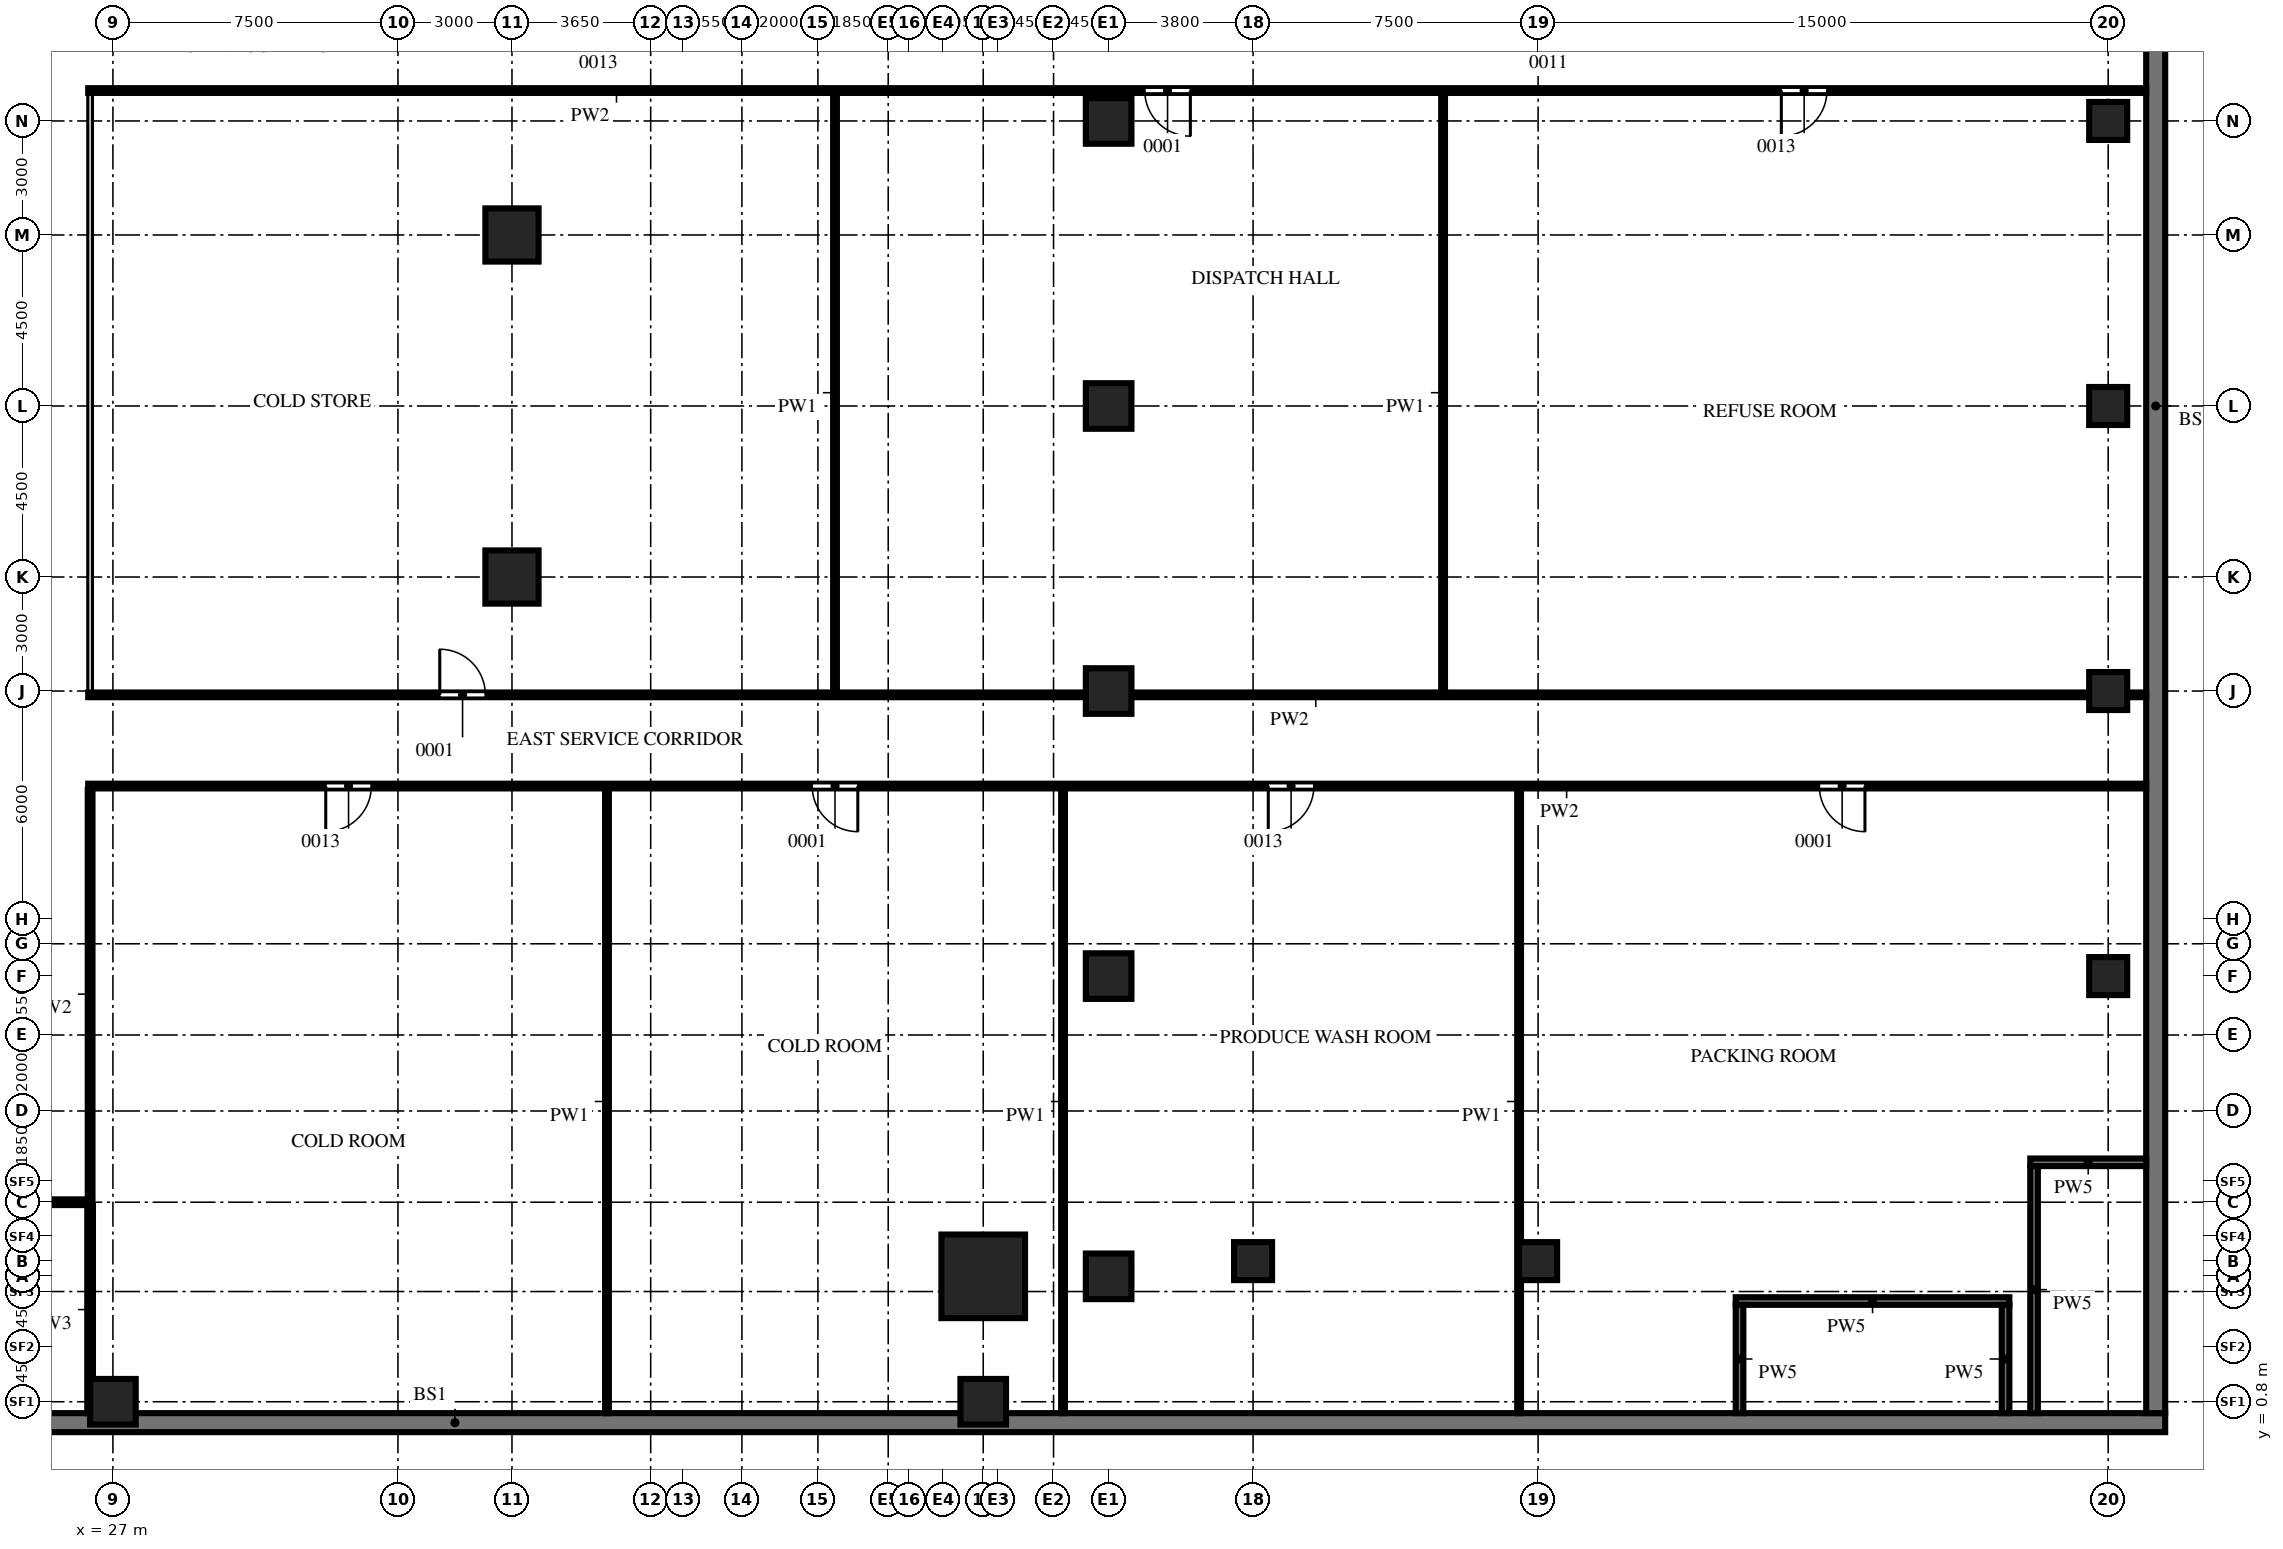
"""IFC4 building model, lengths in metres.
Left out: names, types, materials, properties, quantities, classifications, styles, units other than length and angle.
Written with IfcOpenShell. Run it as: python <this file> out.ifc"""

import sys

from ifc_helpers import new_model, si_unit, direction, frame, frame_2d, origin, origin_2d, place, context, subcontext, project, spatial, rectangle, extrude, source, transform, mapped, element, fill, save


model = new_model("IFC4")
c1 = context("Model", 3, precision=1e-05, world=origin(), true_north=direction((0.0, 1.0)))
c2 = subcontext(c1, "Body", "Model", "MODEL_VIEW")
j1 = project(units=[si_unit("LENGTHUNIT", "METRE"), si_unit("PLANEANGLEUNIT", "RADIAN")], contexts=[c1])
p1 = place(None, origin())
s1 = spatial("IfcSite", under=j1, at=p1, CompositionType="ELEMENT")
p2 = place(p1, origin())
s2 = spatial("IfcBuilding", under=s1, at=p2, CompositionType="ELEMENT")
p3 = place(p2, frame((0.0, 0.0, -4.5)))
s3 = spatial("IfcBuildingStorey", under=s2, at=p3, CompositionType="ELEMENT", Elevation=-4.5)
m1 = source(origin(), c2, "Body", "SweptSolid", [
    extrude(rectangle(XDim=90.0, YDim=0.5, at=frame_2d((45.0, 0.0))), origin(), (0.0, 0.0, 1.0), 4.15),
])
p4 = place(p3, frame((-9.0, 0.25, 0.0), z_axis=(0.0, 0.0, 1.0), x_axis=(1.0, 0.0, 0.0)))
e1 = element("IfcWall", 1, at=p4, inside=s3, PredefinedType="STANDARD", context=c2, shape_type="MappedRepresentation", body=[
    mapped(m1, transform((0.0, 0.0, 0.0))),
])
m2 = source(origin(), c2, "Body", "SweptSolid", [
    extrude(rectangle(XDim=53.0, YDim=0.5, at=frame_2d((26.5, 0.0))), origin(), (0.0, 0.0, 1.0), 4.15),
])
p5 = place(p3, frame((80.75, 0.5, 0.0), z_axis=(0.0, 0.0, 1.0), x_axis=(0.0, 1.0, 0.0)))
e2 = element("IfcWall", 2, at=p5, inside=s3, PredefinedType="STANDARD", context=c2, shape_type="MappedRepresentation", body=[
    mapped(m2, transform((0.0, 0.0, 0.0))),
])
m3 = source(origin(), c2, "Body", "SweptSolid", [
    extrude(rectangle(XDim=2.2, YDim=2.2, at=origin_2d()), origin(), (0.0, 0.0, 1.0), 4.5),
])
p6 = place(p3, frame((49.9, 4.1, 0.0), z_axis=(0.0, 0.0, 1.0), x_axis=(1.0, 0.0, 0.0)))
e3 = element("IfcColumn", 3, at=p6, inside=s3, PredefinedType="COLUMN", context=c2, shape_type="MappedRepresentation", body=[
    mapped(m3, transform((0.0, 0.0, 0.0))),
])
m4 = source(origin(), c2, "Body", "SweptSolid", [
    extrude(rectangle(XDim=1.2, YDim=1.2, at=origin_2d()), origin(), (0.0, 0.0, 1.0), 4.15),
])
for number, where, z_axis, x_axis in (
    (4, (27.0, 0.8, 0.0), (0.0, 0.0, 1.0), (1.0, 0.0, 0.0)),
    (5, (49.9, 0.8, 0.0), (0.0, 0.0, 1.0), (1.0, 0.0, 0.0)),
    (6, (53.2, 4.1, 0.0), (0.0, 0.0, 1.0), (1.0, 0.0, 0.0)),
    (7, (53.2, 12.0, 0.0), (0.0, 0.0, 1.0), (1.0, 0.0, 0.0)),
    (8, (53.2, 19.5, 0.0), (0.0, 0.0, 1.0), (1.0, 0.0, 0.0)),
    (9, (53.2, 27.0, 0.0), (0.0, 0.0, 1.0), (1.0, 0.0, 0.0)),
    (10, (53.2, 34.5, 0.0), (0.0, 0.0, 1.0), (1.0, 0.0, 0.0)),
):
    element("IfcColumn", number, at=place(p3, frame(where, z_axis=z_axis, x_axis=x_axis)), inside=s3, PredefinedType="COLUMN", context=c2, shape_type="MappedRepresentation", body=[
        mapped(m4, transform((0.0, 0.0, 0.0))),
    ])
m5 = source(origin(), c2, "Body", "SweptSolid", [
    extrude(rectangle(XDim=1.4, YDim=1.4, at=origin_2d()), origin(), (0.0, 0.0, 1.0), 4.15),
])
for number, where, z_axis, x_axis in (
    (11, (37.5, 22.5, 0.0), (0.0, 0.0, 1.0), (1.0, 0.0, 0.0)),
    (12, (37.5, 31.5, 0.0), (0.0, 0.0, 1.0), (1.0, 0.0, 0.0)),
):
    element("IfcColumn", number, at=place(p3, frame(where, z_axis=z_axis, x_axis=x_axis)), inside=s3, PredefinedType="COLUMN", context=c2, shape_type="MappedRepresentation", body=[
        mapped(m5, transform((0.0, 0.0, 0.0))),
    ])
m6 = source(origin(), c2, "Body", "SweptSolid", [
    extrude(rectangle(XDim=1.0, YDim=1.0, at=origin_2d()), origin(), (0.0, 0.0, 1.0), 4.15),
])
for number, where, z_axis, x_axis in (
    (13, (57.0, 4.5, 0.0), (0.0, 0.0, 1.0), (1.0, 0.0, 0.0)),
    (14, (64.5, 4.5, 0.0), (0.0, 0.0, 1.0), (1.0, 0.0, 0.0)),
    (15, (79.5, 12.0, 0.0), (0.0, 0.0, 1.0), (1.0, 0.0, 0.0)),
    (16, (79.5, 19.5, 0.0), (0.0, 0.0, 1.0), (1.0, 0.0, 0.0)),
    (17, (79.5, 27.0, 0.0), (0.0, 0.0, 1.0), (1.0, 0.0, 0.0)),
    (18, (79.5, 34.5, 0.0), (0.0, 0.0, 1.0), (1.0, 0.0, 0.0)),
):
    element("IfcColumn", number, at=place(p3, frame(where, z_axis=z_axis, x_axis=x_axis)), inside=s3, PredefinedType="COLUMN", context=c2, shape_type="MappedRepresentation", body=[
        mapped(m6, transform((0.0, 0.0, 0.0))),
    ])
m7 = source(origin(), c2, "Body", "SweptSolid", [
    extrude(rectangle(XDim=5.45, YDim=0.15, at=frame_2d((2.725, 0.0))), origin(), (0.0, 0.0, 1.0), 4.15),
])
p7 = place(p3, frame((26.4, 0.5, 0.0), z_axis=(0.0, 0.0, 1.0), x_axis=(0.0, 1.0, 0.0)))
e19 = element("IfcWall", 19, at=p7, inside=s3, PredefinedType="PARTITIONING", context=c2, shape_type="MappedRepresentation", body=[
    mapped(m7, transform((0.0, 0.0, 0.0))),
])
m8 = source(origin(), c2, "Body", "SweptSolid", [
    extrude(rectangle(XDim=16.4, YDim=0.1, at=frame_2d((8.2, 0.0))), origin(), (0.0, 0.0, 1.0), 4.15),
])
for number, where, z_axis, x_axis in (
    (20, (40.0, 0.5, 0.0), (0.0, 0.0, 1.0), (0.0, 1.0, 0.0)),
    (21, (52.0, 0.5, 0.0), (0.0, 0.0, 1.0), (0.0, 1.0, 0.0)),
    (22, (64.0, 0.5, 0.0), (0.0, 0.0, 1.0), (0.0, 1.0, 0.0)),
):
    element("IfcWall", number, at=place(p3, frame(where, z_axis=z_axis, x_axis=x_axis)), inside=s3, PredefinedType="PARTITIONING", context=c2, shape_type="MappedRepresentation", body=[
        mapped(m8, transform((0.0, 0.0, 0.0))),
    ])
m9 = source(origin(), c2, "Body", "SweptSolid", [
    extrude(rectangle(XDim=22.3, YDim=0.15, at=frame_2d((11.15, 0.0))), origin(), (0.0, 0.0, 1.0), 4.15),
])
p8 = place(p3, frame((4.15, 6.05, 0.0), z_axis=(0.0, 0.0, 1.0), x_axis=(1.0, 0.0, 0.0)))
e23 = element("IfcWall", 23, at=p8, inside=s3, PredefinedType="PARTITIONING", context=c2, shape_type="MappedRepresentation", body=[
    mapped(m9, transform((0.0, 0.0, 0.0))),
])
m10 = source(origin(), c2, "Body", "SweptSolid", [
    extrude(rectangle(XDim=1.2, YDim=2.1, at=frame_2d((0.6, 1.05))), frame((0.0, 0.085, 0.0), z_axis=(0.0, -1.0, 0.0), x_axis=(1.0, 0.0, 0.0)), (0.0, 0.0, 1.0), 0.17),
])
p9 = place(p8, frame((9.2, 0.0, 0.0)))
e24 = element("IfcOpeningElement", 24, at=p9, cuts=e23, PredefinedType="OPENING", context=c2, shape_type="MappedRepresentation", body=[
    mapped(m10, transform((0.0, 0.0, 0.0))),
])
m11 = source(origin(), c2, "Body", "SweptSolid", [
    extrude(rectangle(XDim=10.75, YDim=0.125, at=frame_2d((5.375, 0.0))), origin(), (0.0, 0.0, 1.0), 4.15),
])
p10 = place(p3, frame((26.4, 6.15, 0.0), z_axis=(0.0, 0.0, 1.0), x_axis=(0.0, 1.0, 0.0)))
e25 = element("IfcWall", 25, at=p10, inside=s3, PredefinedType="PARTITIONING", context=c2, shape_type="MappedRepresentation", body=[
    mapped(m11, transform((0.0, 0.0, 0.0))),
])
m12 = source(origin(), c2, "Body", "SweptSolid", [
    extrude(rectangle(XDim=54.15, YDim=0.125, at=frame_2d((27.075, 0.0))), origin(), (0.0, 0.0, 1.0), 4.15),
])
p11 = place(p3, frame((26.35, 17.0, 0.0), z_axis=(0.0, 0.0, 1.0), x_axis=(1.0, 0.0, 0.0)))
e26 = element("IfcWall", 26, at=p11, inside=s3, PredefinedType="PARTITIONING", context=c2, shape_type="MappedRepresentation", body=[
    mapped(m12, transform((0.0, 0.0, 0.0))),
])
m13 = source(origin(), c2, "Body", "SweptSolid", [
    extrude(rectangle(XDim=1.2, YDim=2.1, at=frame_2d((0.6, 1.05))), frame((0.0, 0.073, 0.0), z_axis=(0.0, -1.0, 0.0), x_axis=(1.0, 0.0, 0.0)), (0.0, 0.0, 1.0), 0.145),
])
p12 = place(p11, frame((6.25, 0.0, 0.0)))
e27 = element("IfcOpeningElement", 27, at=p12, cuts=e26, PredefinedType="OPENING", context=c2, shape_type="MappedRepresentation", body=[
    mapped(m13, transform((0.0, 0.0, 0.0))),
])
p13 = place(p11, frame((19.05, 0.0, 0.0)))
e28 = element("IfcOpeningElement", 28, at=p13, cuts=e26, PredefinedType="OPENING", context=c2, shape_type="MappedRepresentation", body=[
    mapped(m13, transform((0.0, 0.0, 0.0))),
])
p14 = place(p11, frame((31.05, 0.0, 0.0)))
e29 = element("IfcOpeningElement", 29, at=p14, cuts=e26, PredefinedType="OPENING", context=c2, shape_type="MappedRepresentation", body=[
    mapped(m13, transform((0.0, 0.0, 0.0))),
])
p15 = place(p11, frame((45.55, 0.0, 0.0)))
e30 = element("IfcOpeningElement", 30, at=p15, cuts=e26, PredefinedType="OPENING", context=c2, shape_type="MappedRepresentation", body=[
    mapped(m13, transform((0.0, 0.0, 0.0))),
])
p16 = place(p3, frame((26.35, 19.4, 0.0), z_axis=(0.0, 0.0, 1.0), x_axis=(1.0, 0.0, 0.0)))
e31 = element("IfcWall", 31, at=p16, inside=s3, PredefinedType="PARTITIONING", context=c2, shape_type="MappedRepresentation", body=[
    mapped(m12, transform((0.0, 0.0, 0.0))),
])
p17 = place(p16, frame((9.25, 0.0, 0.0)))
e32 = element("IfcOpeningElement", 32, at=p17, cuts=e31, PredefinedType="OPENING", context=c2, shape_type="MappedRepresentation", body=[
    mapped(m13, transform((0.0, 0.0, 0.0))),
])
m14 = source(origin(), c2, "Body", "SweptSolid", [
    extrude(rectangle(XDim=15.7, YDim=0.125, at=frame_2d((7.85, 0.0))), origin(), (0.0, 0.0, 1.0), 4.15),
])
p18 = place(p3, frame((26.4, 19.5, 0.0), z_axis=(0.0, 0.0, 1.0), x_axis=(0.0, 1.0, 0.0)))
e33 = element("IfcWall", 33, at=p18, inside=s3, PredefinedType="PARTITIONING", context=c2, shape_type="MappedRepresentation", body=[
    mapped(m14, transform((0.0, 0.0, 0.0))),
])
m15 = source(origin(), c2, "Body", "SweptSolid", [
    extrude(rectangle(XDim=15.7, YDim=0.1, at=frame_2d((7.85, 0.0))), origin(), (0.0, 0.0, 1.0), 4.15),
])
for number, where, z_axis, x_axis in (
    (34, (46.0, 19.5, 0.0), (0.0, 0.0, 1.0), (0.0, 1.0, 0.0)),
    (35, (62.0, 19.5, 0.0), (0.0, 0.0, 1.0), (0.0, 1.0, 0.0)),
):
    element("IfcWall", number, at=place(p3, frame(where, z_axis=z_axis, x_axis=x_axis)), inside=s3, PredefinedType="PARTITIONING", context=c2, shape_type="MappedRepresentation", body=[
        mapped(m15, transform((0.0, 0.0, 0.0))),
    ])
p19 = place(p3, frame((26.35, 35.3, 0.0), z_axis=(0.0, 0.0, 1.0), x_axis=(1.0, 0.0, 0.0)))
e36 = element("IfcWall", 36, at=p19, inside=s3, PredefinedType="PARTITIONING", context=c2, shape_type="MappedRepresentation", body=[
    mapped(m12, transform((0.0, 0.0, 0.0))),
])
p20 = place(p19, frame((27.8, 0.0, 0.0)))
e37 = element("IfcOpeningElement", 37, at=p20, cuts=e36, PredefinedType="OPENING", context=c2, shape_type="MappedRepresentation", body=[
    mapped(m13, transform((0.0, 0.0, 0.0))),
])
p21 = place(p19, frame((44.55, 0.0, 0.0)))
e38 = element("IfcOpeningElement", 38, at=p21, cuts=e36, PredefinedType="OPENING", context=c2, shape_type="MappedRepresentation", body=[
    mapped(m13, transform((0.0, 0.0, 0.0))),
])
m16 = source(origin(), c2, "Body", "SweptSolid", [
    extrude(rectangle(XDim=7.2, YDim=0.2, at=frame_2d((3.6, 0.0))), origin(), (0.0, 0.0, 1.0), 4.15),
])
p22 = place(p3, frame((69.7, 3.45, 0.0), z_axis=(0.0, 0.0, 1.0), x_axis=(1.0, 0.0, 0.0)))
e39 = element("IfcWall", 39, at=p22, inside=s3, PredefinedType="PARTITIONING", context=c2, shape_type="MappedRepresentation", body=[
    mapped(m16, transform((0.0, 0.0, 0.0))),
])
m17 = source(origin(), c2, "Body", "SweptSolid", [
    extrude(rectangle(XDim=2.85, YDim=0.2, at=frame_2d((1.425, 0.0))), origin(), (0.0, 0.0, 1.0), 4.15),
])
for number, where, z_axis, x_axis in (
    (40, (69.8, 0.5, 0.0), (0.0, 0.0, 1.0), (0.0, 1.0, 0.0)),
    (41, (76.8, 0.5, 0.0), (0.0, 0.0, 1.0), (0.0, 1.0, 0.0)),
):
    element("IfcWall", number, at=place(p3, frame(where, z_axis=z_axis, x_axis=x_axis)), inside=s3, PredefinedType="PARTITIONING", context=c2, shape_type="MappedRepresentation", body=[
        mapped(m17, transform((0.0, 0.0, 0.0))),
    ])
m18 = source(origin(), c2, "Body", "SweptSolid", [
    extrude(rectangle(XDim=3.05, YDim=0.2, at=frame_2d((1.525, 0.0))), origin(), (0.0, 0.0, 1.0), 4.15),
])
p23 = place(p3, frame((77.45, 7.1, 0.0), z_axis=(0.0, 0.0, 1.0), x_axis=(1.0, 0.0, 0.0)))
e42 = element("IfcWall", 42, at=p23, inside=s3, PredefinedType="PARTITIONING", context=c2, shape_type="MappedRepresentation", body=[
    mapped(m18, transform((0.0, 0.0, 0.0))),
])
m19 = source(origin(), c2, "Body", "SweptSolid", [
    extrude(rectangle(XDim=6.5, YDim=0.2, at=frame_2d((3.25, 0.0))), origin(), (0.0, 0.0, 1.0), 4.15),
])
p24 = place(p3, frame((77.55, 0.5, 0.0), z_axis=(0.0, 0.0, 1.0), x_axis=(0.0, 1.0, 0.0)))
e43 = element("IfcWall", 43, at=p24, inside=s3, PredefinedType="PARTITIONING", context=c2, shape_type="MappedRepresentation", body=[
    mapped(m19, transform((0.0, 0.0, 0.0))),
])
m20 = source(origin(), c2, "Body", "SweptSolid", [
    extrude(rectangle(XDim=1.2, YDim=2.1, at=frame_2d((0.6, 1.05))), frame((0.0, 0.025, 0.0), z_axis=(0.0, -1.0, 0.0), x_axis=(1.0, 0.0, 0.0)), (0.0, 0.0, 1.0), 0.05),
])
p25 = place(p12, origin())
e44 = element("IfcDoor", 44, at=p25, inside=s3, OperationType="SINGLE_SWING_LEFT", PredefinedType="DOOR", context=c2, shape_type="MappedRepresentation", body=[
    mapped(m20, transform((0.0, 0.0, 0.0))),
])
fill(e27, e44)
p26 = place(p13, origin())
e45 = element("IfcDoor", 45, at=p26, inside=s3, OperationType="SINGLE_SWING_RIGHT", PredefinedType="DOOR", context=c2, shape_type="MappedRepresentation", body=[
    mapped(m20, transform((0.0, 0.0, 0.0))),
])
fill(e28, e45)
p27 = place(p14, origin())
e46 = element("IfcDoor", 46, at=p27, inside=s3, OperationType="SINGLE_SWING_LEFT", PredefinedType="DOOR", context=c2, shape_type="MappedRepresentation", body=[
    mapped(m20, transform((0.0, 0.0, 0.0))),
])
fill(e29, e46)
p28 = place(p15, origin())
e47 = element("IfcDoor", 47, at=p28, inside=s3, OperationType="SINGLE_SWING_RIGHT", PredefinedType="DOOR", context=c2, shape_type="MappedRepresentation", body=[
    mapped(m20, transform((0.0, 0.0, 0.0))),
])
fill(e30, e47)
p29 = place(p17, origin())
e48 = element("IfcDoor", 48, at=p29, inside=s3, OperationType="SINGLE_SWING_RIGHT", PredefinedType="DOOR", context=c2, shape_type="MappedRepresentation", body=[
    mapped(m20, transform((0.0, 0.0, 0.0))),
])
fill(e32, e48)
p30 = place(p20, origin())
e49 = element("IfcDoor", 49, at=p30, inside=s3, OperationType="SINGLE_SWING_RIGHT", PredefinedType="DOOR", context=c2, shape_type="MappedRepresentation", body=[
    mapped(m20, transform((0.0, 0.0, 0.0))),
])
fill(e37, e49)
p31 = place(p21, origin())
e50 = element("IfcDoor", 50, at=p31, inside=s3, OperationType="SINGLE_SWING_LEFT", PredefinedType="DOOR", context=c2, shape_type="MappedRepresentation", body=[
    mapped(m20, transform((0.0, 0.0, 0.0))),
])
fill(e38, e50)
save(model, sys.argv[1])
